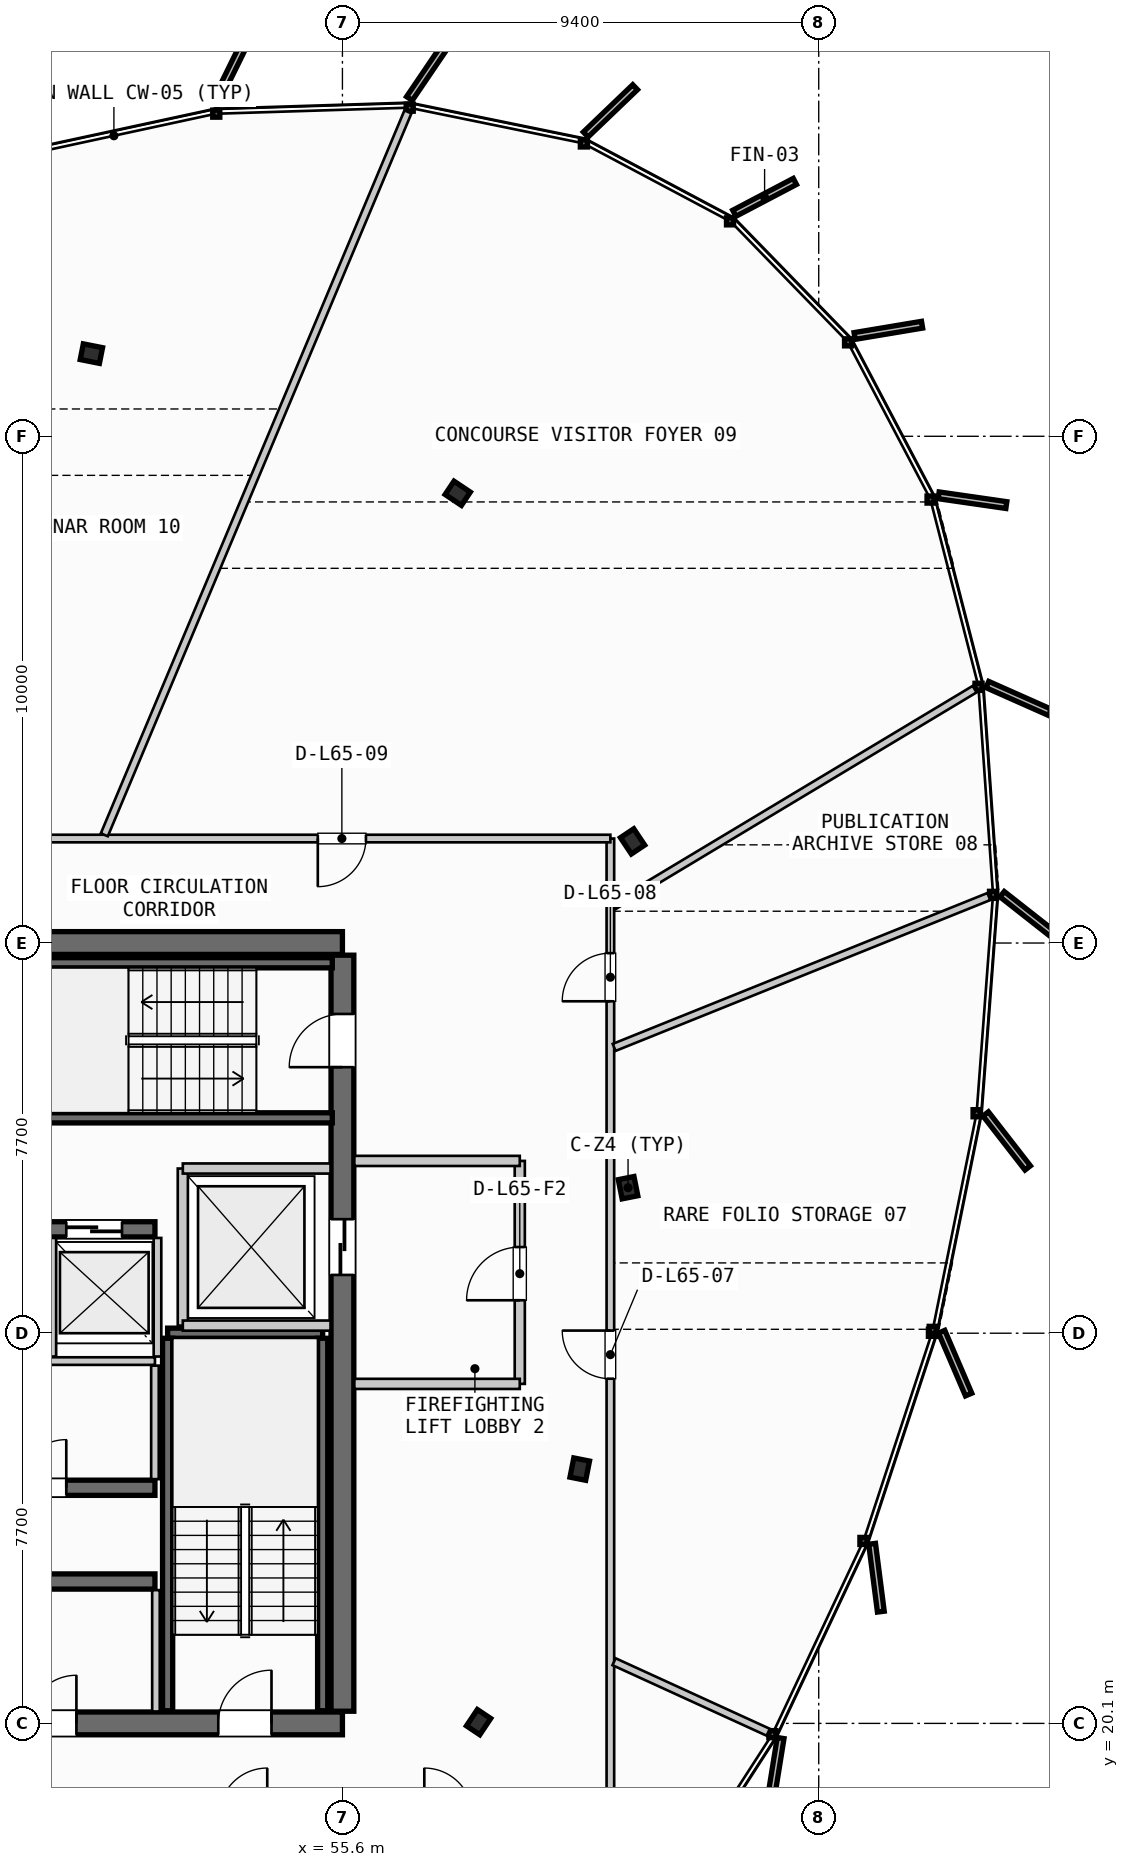
"""IFC4 building model, lengths in metres.
Left out: names, types, materials, properties, quantities, classifications, styles, units other than length and angle.
Written with IfcOpenShell. Run it as: python <this file> out.ifc"""

import sys

from ifc_helpers import new_model, si_unit, direction, frame, frame_2d, origin, origin_2d, place, context, subcontext, project, spatial, rectangle, i_section, extrude, source, transform, mapped, element, fill, save


model = new_model("IFC4")
c1 = context("Model", 3, precision=1e-05, world=origin(), true_north=direction((0.0, 1.0)))
c2 = subcontext(c1, "Body", "Model", "MODEL_VIEW")
j1 = project(units=[si_unit("LENGTHUNIT", "METRE"), si_unit("PLANEANGLEUNIT", "RADIAN")], contexts=[c1])
p1 = place(None, origin())
s1 = spatial("IfcSite", under=j1, at=p1, CompositionType="ELEMENT")
p2 = place(p1, origin())
s2 = spatial("IfcBuilding", under=s1, at=p2, CompositionType="ELEMENT")
p3 = place(p2, frame((0.0, 0.0, 249.1)))
s3 = spatial("IfcBuildingStorey", under=s2, at=p3, CompositionType="ELEMENT", Elevation=249.1)
p4 = place(p3, frame((38.0, 20.1, 0.0), z_axis=(0.0, 0.0, 1.0), x_axis=(1.0, 0.0, 0.0)))
e1 = element("IfcWall", 1, at=p4, inside=s3, PredefinedType="SHEAR", context=c2, shape_type="SweptSolid", body=[
    extrude(rectangle(XDim=17.6, YDim=0.45, at=frame_2d((8.8, 0.0))), origin(), (0.0, 0.0, 1.0), 3.21),
])
p5 = place(p4, frame((1.4, 0.0, 0.0)))
e2 = element("IfcOpeningElement", 2, at=p5, cuts=e1, PredefinedType="OPENING", context=c2, shape_type="SweptSolid", body=[
    extrude(rectangle(XDim=1.05, YDim=2.15, at=frame_2d((0.525, 1.075))), frame((0.0, 0.235, 0.0), z_axis=(0.0, -1.0, 0.0), x_axis=(1.0, 0.0, 0.0)), (0.0, 0.0, 1.0), 0.47),
])
p6 = place(p4, frame((15.15, 0.0, 0.0)))
e3 = element("IfcOpeningElement", 3, at=p6, cuts=e1, PredefinedType="OPENING", context=c2, shape_type="SweptSolid", body=[
    extrude(rectangle(XDim=1.05, YDim=2.15, at=frame_2d((0.525, 1.075))), frame((0.0, 0.235, 0.0), z_axis=(0.0, -1.0, 0.0), x_axis=(1.0, 0.0, 0.0)), (0.0, 0.0, 1.0), 0.47),
])
p7 = place(p4, frame((5.25, 0.0, 0.0)))
e4 = element("IfcOpeningElement", 4, at=p7, cuts=e1, PredefinedType="OPENING", context=c2, shape_type="SweptSolid", body=[
    extrude(rectangle(XDim=0.95, YDim=2.15, at=frame_2d((0.475, 1.075))), frame((0.0, 0.235, 0.0), z_axis=(0.0, -1.0, 0.0), x_axis=(1.0, 0.0, 0.0)), (0.0, 0.0, 1.0), 0.47),
])
p8 = place(p4, frame((11.4, 0.0, 0.0)))
e5 = element("IfcOpeningElement", 5, at=p8, cuts=e1, PredefinedType="OPENING", context=c2, shape_type="SweptSolid", body=[
    extrude(rectangle(XDim=0.95, YDim=2.15, at=frame_2d((0.475, 1.075))), frame((0.0, 0.235, 0.0), z_axis=(0.0, -1.0, 0.0), x_axis=(1.0, 0.0, 0.0)), (0.0, 0.0, 1.0), 0.47),
])
p9 = place(p3, frame((55.6, 35.5, 0.0), z_axis=(0.0, 0.0, 1.0), x_axis=(-1.0, 0.0, 0.0)))
e6 = element("IfcWall", 6, at=p9, inside=s3, PredefinedType="SHEAR", context=c2, shape_type="SweptSolid", body=[
    extrude(rectangle(XDim=17.6, YDim=0.45, at=frame_2d((8.8, 0.0))), origin(), (0.0, 0.0, 1.0), 3.21),
])
p10 = place(p9, frame((8.05, 0.0, 0.0)))
e7 = element("IfcOpeningElement", 7, at=p10, cuts=e6, PredefinedType="OPENING", context=c2, shape_type="SweptSolid", body=[
    extrude(rectangle(XDim=1.5, YDim=2.2, at=frame_2d((0.75, 1.1))), frame((0.0, 0.235, 0.0), z_axis=(0.0, -1.0, 0.0), x_axis=(1.0, 0.0, 0.0)), (0.0, 0.0, 1.0), 0.47),
])
p11 = place(p9, frame((15.1, 0.0, 0.0)))
e8 = element("IfcOpeningElement", 8, at=p11, cuts=e6, PredefinedType="OPENING", context=c2, shape_type="SweptSolid", body=[
    extrude(rectangle(XDim=0.95, YDim=2.15, at=frame_2d((0.475, 1.075))), frame((0.0, 0.235, 0.0), z_axis=(0.0, -1.0, 0.0), x_axis=(1.0, 0.0, 0.0)), (0.0, 0.0, 1.0), 0.47),
])
p12 = place(p9, frame((12.6, 0.0, 0.0)))
e9 = element("IfcOpeningElement", 9, at=p12, cuts=e6, PredefinedType="OPENING", context=c2, shape_type="SweptSolid", body=[
    extrude(rectangle(XDim=0.95, YDim=2.15, at=frame_2d((0.475, 1.075))), frame((0.0, 0.235, 0.0), z_axis=(0.0, -1.0, 0.0), x_axis=(1.0, 0.0, 0.0)), (0.0, 0.0, 1.0), 0.47),
])
p13 = place(p9, frame((10.45, 0.0, 0.0)))
e10 = element("IfcOpeningElement", 10, at=p13, cuts=e6, PredefinedType="OPENING", context=c2, shape_type="SweptSolid", body=[
    extrude(rectangle(XDim=0.95, YDim=2.15, at=frame_2d((0.475, 1.075))), frame((0.0, 0.235, 0.0), z_axis=(0.0, -1.0, 0.0), x_axis=(1.0, 0.0, 0.0)), (0.0, 0.0, 1.0), 0.47),
])
p14 = place(p3, frame((55.6, 20.34, 0.0), z_axis=(0.0, 0.0, 1.0), x_axis=(0.0, 1.0, 0.0)))
e11 = element("IfcWall", 11, at=p14, inside=s3, PredefinedType="SHEAR", context=c2, shape_type="SweptSolid", body=[
    extrude(rectangle(XDim=14.92, YDim=0.45, at=frame_2d((7.46, 0.0))), origin(), (0.0, 0.0, 1.0), 3.21),
])
p15 = place(p14, frame((12.71, 0.0, 0.0)))
e12 = element("IfcOpeningElement", 12, at=p15, cuts=e11, PredefinedType="OPENING", context=c2, shape_type="SweptSolid", body=[
    extrude(rectangle(XDim=1.05, YDim=2.15, at=frame_2d((0.525, 1.075))), frame((0.0, 0.235, 0.0), z_axis=(0.0, -1.0, 0.0), x_axis=(1.0, 0.0, 0.0)), (0.0, 0.0, 1.0), 0.47),
])
p16 = place(p14, frame((8.61, 0.0, 0.0)))
e13 = element("IfcOpeningElement", 13, at=p16, cuts=e11, PredefinedType="OPENING", context=c2, shape_type="SweptSolid", body=[
    extrude(rectangle(XDim=1.1, YDim=2.2, at=frame_2d((0.55, 1.1))), frame((0.0, 0.235, 0.0), z_axis=(0.0, -1.0, 0.0), x_axis=(1.0, 0.0, 0.0)), (0.0, 0.0, 1.0), 0.47),
])
p17 = place(p3, frame((47.65, 22.9, 0.0), z_axis=(0.0, 0.0, 1.0), x_axis=(1.0, 0.0, 0.0)))
e14 = element("IfcWall", 14, at=p17, inside=s3, PredefinedType="SHEAR", context=c2, shape_type="SweptSolid", body=[
    extrude(rectangle(XDim=4.25, YDim=0.3, at=frame_2d((2.125, 0.0))), origin(), (0.0, 0.0, 1.0), 3.21),
])
p18 = place(p3, frame((47.65, 24.75, 0.0), z_axis=(0.0, 0.0, 1.0), x_axis=(1.0, 0.0, 0.0)))
e15 = element("IfcWall", 15, at=p18, inside=s3, PredefinedType="SHEAR", context=c2, shape_type="SweptSolid", body=[
    extrude(rectangle(XDim=4.25, YDim=0.3, at=frame_2d((2.125, 0.0))), origin(), (0.0, 0.0, 1.0), 3.21),
])
p19 = place(p18, frame((1.55, 0.0, 0.0)))
e16 = element("IfcOpeningElement", 16, at=p19, cuts=e15, PredefinedType="OPENING", context=c2, shape_type="SweptSolid", body=[
    extrude(rectangle(XDim=0.95, YDim=2.15, at=frame_2d((0.475, 1.075))), frame((0.0, 0.16, 0.0), z_axis=(0.0, -1.0, 0.0), x_axis=(1.0, 0.0, 0.0)), (0.0, 0.0, 1.0), 0.32),
])
p20 = place(p3, frame((47.65, 29.85, 0.0), z_axis=(0.0, 0.0, 1.0), x_axis=(1.0, 0.0, 0.0)))
e17 = element("IfcWall", 17, at=p20, inside=s3, PredefinedType="SHEAR", context=c2, shape_type="SweptSolid", body=[
    extrude(rectangle(XDim=4.25, YDim=0.3, at=frame_2d((2.125, 0.0))), origin(), (0.0, 0.0, 1.0), 3.21),
])
p21 = place(p20, frame((0.45, 0.0, 0.0)))
e18 = element("IfcOpeningElement", 18, at=p21, cuts=e17, PredefinedType="OPENING", context=c2, shape_type="SweptSolid", body=[
    extrude(rectangle(XDim=1.1, YDim=2.2, at=frame_2d((0.55, 1.1))), frame((0.0, 0.16, 0.0), z_axis=(0.0, -1.0, 0.0), x_axis=(1.0, 0.0, 0.0)), (0.0, 0.0, 1.0), 0.32),
])
p22 = place(p20, frame((2.5, 0.0, 0.0)))
e19 = element("IfcOpeningElement", 19, at=p22, cuts=e17, PredefinedType="OPENING", context=c2, shape_type="SweptSolid", body=[
    extrude(rectangle(XDim=1.1, YDim=2.2, at=frame_2d((0.55, 1.1))), frame((0.0, 0.16, 0.0), z_axis=(0.0, -1.0, 0.0), x_axis=(1.0, 0.0, 0.0)), (0.0, 0.0, 1.0), 0.32),
])
m1 = source(origin(), c2, "Body", "SweptSolid", [
    extrude(i_section(OverallWidth=0.387, OverallDepth=0.316, WebThickness=0.019, FlangeThickness=0.028, FilletRadius=0.015, at=origin_2d()), origin(), (0.0, 0.0, 1.0), 3.21),
])
for number, where, z_axis, x_axis in (
    (20, (61.237, 30.672, 0.0), (0.0, 0.0, 1.0), (0.981, 0.195, 0.0)),
    (21, (61.326, 37.506, 0.0), (0.0, 0.0, 1.0), (0.831, 0.556, 0.0)),
    (22, (57.875, 44.375, 0.0), (0.0, 0.0, 1.0), (0.556, 0.831, 0.0)),
    (23, (50.645, 47.132, 0.0), (0.0, 0.0, 1.0), (0.195, 0.981, 0.0)),
    (24, (58.287, 20.125, 0.0), (0.0, 0.0, 1.0), (0.831, -0.556, 0.0)),
    (25, (60.284, 25.118, 0.0), (0.0, 0.0, 1.0), (0.981, -0.195, 0.0)),
):
    element("IfcColumn", number, at=place(p3, frame(where, z_axis=z_axis, x_axis=x_axis)), inside=s3, PredefinedType="COLUMN", context=c2, shape_type="MappedRepresentation", body=[
        mapped(m1, transform((0.0, 0.0, 0.0), scale=1.0)),
    ])
p23 = place(p3, frame((52.15, 27.8, 0.0), z_axis=(0.0, 0.0, 1.0), x_axis=(1.0, 0.0, 0.0)))
e26 = element("IfcWall", 26, at=p23, inside=s3, PredefinedType="SHEAR", context=c2, shape_type="SweptSolid", body=[
    extrude(rectangle(XDim=3.06, YDim=0.2, at=frame_2d((1.53, 0.0))), origin(), (0.0, 0.0, 1.0), 3.21),
])
for number, where, z_axis, x_axis in (
    (27, (55.21, 27.7, 0.0), (0.0, 0.0, 1.0), (0.0, -1.0, 0.0)),
    (28, (52.15, 20.35, 0.0), (0.0, 0.0, 1.0), (0.0, 1.0, 0.0)),
    (29, (48.05, 35.11, 0.0), (0.0, 0.0, 1.0), (1.0, 0.0, 0.0)),
    (30, (55.4, 32.05, 0.0), (0.0, 0.0, 1.0), (-1.0, 0.0, 0.0)),
):
    element("IfcWall", number, at=place(p3, frame(where, z_axis=z_axis, x_axis=x_axis)), inside=s3, PredefinedType="SHEAR", context=c2, shape_type="SweptSolid", body=[
        extrude(rectangle(XDim=7.35, YDim=0.2, at=frame_2d((3.675, 0.0))), origin(), (0.0, 0.0, 1.0), 3.21),
    ])
p24 = place(p3, frame((52.45, 27.95, 0.0), z_axis=(0.0, 0.0, 1.0), x_axis=(0.0, 1.0, 0.0)))
e31 = element("IfcWall", 31, at=p24, inside=s3, PredefinedType="PARTITIONING", context=c2, shape_type="SweptSolid", body=[
    extrude(rectangle(XDim=3.1, YDim=0.2, at=frame_2d((1.55, 0.0))), origin(), (0.0, 0.0, 1.0), 2.28),
])
for number, where, z_axis, x_axis in (
    (32, (52.45, 27.95, 0.0), (0.0, 0.0, 1.0), (1.0, 0.0, 0.0)),
    (33, (52.45, 31.05, 0.0), (0.0, 0.0, 1.0), (1.0, 0.0, 0.0)),
):
    element("IfcWall", number, at=place(p3, frame(where, z_axis=z_axis, x_axis=x_axis)), inside=s3, PredefinedType="PARTITIONING", context=c2, shape_type="SweptSolid", body=[
        extrude(rectangle(XDim=2.915, YDim=0.2, at=frame_2d((1.458, 0.0))), origin(), (0.0, 0.0, 1.0), 2.28),
    ])
p25 = place(p3, frame((59.1, 26.8, 0.0), z_axis=(0.0, 0.0, 1.0), x_axis=(0.0, 1.0, 0.0)))
e34 = element("IfcWall", 34, at=p25, inside=s3, PredefinedType="PARTITIONING", context=c2, shape_type="SweptSolid", body=[
    extrude(rectangle(XDim=4.4, YDim=0.2, at=frame_2d((2.2, 0.0))), origin(), (0.0, 0.0, 1.0), 2.28),
])
p26 = place(p25, frame((1.65, 0.0, 0.0)))
e35 = element("IfcOpeningElement", 35, at=p26, cuts=e34, PredefinedType="OPENING", context=c2, shape_type="SweptSolid", body=[
    extrude(rectangle(XDim=1.05, YDim=2.15, at=frame_2d((0.525, 1.075))), frame((0.0, 0.11, 0.0), z_axis=(0.0, -1.0, 0.0), x_axis=(1.0, 0.0, 0.0)), (0.0, 0.0, 1.0), 0.22),
])
for number, where, z_axis, x_axis in (
    (36, (55.835, 26.8, 0.0), (0.0, 0.0, 1.0), (1.0, 0.0, 0.0)),
    (37, (55.835, 31.2, 0.0), (0.0, 0.0, 1.0), (1.0, 0.0, 0.0)),
):
    element("IfcWall", number, at=place(p3, frame(where, z_axis=z_axis, x_axis=x_axis)), inside=s3, PredefinedType="PARTITIONING", context=c2, shape_type="SweptSolid", body=[
        extrude(rectangle(XDim=3.265, YDim=0.2, at=frame_2d((1.633, 0.0))), origin(), (0.0, 0.0, 1.0), 2.28),
    ])
p27 = place(p3, frame((51.92, 20.335, 0.0), z_axis=(0.0, 0.0, 1.0), x_axis=(0.0, 1.0, 0.0)))
e38 = element("IfcWall", 38, at=p27, inside=s3, PredefinedType="PARTITIONING", context=c2, shape_type="SweptSolid", body=[
    extrude(rectangle(XDim=2.395, YDim=0.15, at=frame_2d((1.198, 0.0))), origin(), (0.0, 0.0, 1.0), 2.28),
])
p28 = place(p3, frame((47.65, 27.25, 0.0), z_axis=(0.0, 0.0, 1.0), x_axis=(1.0, 0.0, 0.0)))
e39 = element("IfcWall", 39, at=p28, inside=s3, PredefinedType="PARTITIONING", context=c2, shape_type="SweptSolid", body=[
    extrude(rectangle(XDim=4.25, YDim=0.15, at=frame_2d((2.125, 0.0))), origin(), (0.0, 0.0, 1.0), 2.28),
])
p29 = place(p3, frame((51.9, 24.92, 0.0), z_axis=(0.0, 0.0, 1.0), x_axis=(0.0, 1.0, 0.0)))
e40 = element("IfcWall", 40, at=p29, inside=s3, PredefinedType="PARTITIONING", context=c2, shape_type="SweptSolid", body=[
    extrude(rectangle(XDim=2.24, YDim=0.15, at=frame_2d((1.12, 0.0))), origin(), (0.0, 0.0, 1.0), 2.28),
])
for number, where, z_axis, x_axis in (
    (41, (49.875, 27.34, 0.0), (0.0, 0.0, 1.0), (0.0, 1.0, 0.0)),
    (42, (51.95, 27.34, 0.0), (0.0, 0.0, 1.0), (0.0, 1.0, 0.0)),
):
    element("IfcWall", number, at=place(p3, frame(where, z_axis=z_axis, x_axis=x_axis)), inside=s3, PredefinedType="PARTITIONING", context=c2, shape_type="SweptSolid", body=[
        extrude(rectangle(XDim=2.34, YDim=0.15, at=frame_2d((1.17, 0.0))), origin(), (0.0, 0.0, 1.0), 2.28),
    ])
p30 = place(p3, frame((60.888, 18.269, 0.0), z_axis=(0.0, 0.0, 1.0), x_axis=(0.0, 1.0, 0.0)))
e43 = element("IfcWall", 43, at=p30, inside=s3, PredefinedType="PARTITIONING", context=c2, shape_type="SweptSolid", body=[
    extrude(rectangle(XDim=19.293, YDim=0.15, at=frame_2d((9.646, 0.0))), origin(), (0.0, 0.0, 1.0), 2.28),
])
p31 = place(p30, frame((8.633, 0.0, 0.0)))
e44 = element("IfcOpeningElement", 44, at=p31, cuts=e43, PredefinedType="OPENING", context=c2, shape_type="SweptSolid", body=[
    extrude(rectangle(XDim=0.95, YDim=2.15, at=frame_2d((0.475, 1.075))), frame((0.0, 0.085, 0.0), z_axis=(0.0, -1.0, 0.0), x_axis=(1.0, 0.0, 0.0)), (0.0, 0.0, 1.0), 0.17),
])
p32 = place(p30, frame((16.081, 0.0, 0.0)))
e45 = element("IfcOpeningElement", 45, at=p32, cuts=e43, PredefinedType="OPENING", context=c2, shape_type="SweptSolid", body=[
    extrude(rectangle(XDim=0.95, YDim=2.15, at=frame_2d((0.475, 1.075))), frame((0.0, 0.085, 0.0), z_axis=(0.0, -1.0, 0.0), x_axis=(1.0, 0.0, 0.0)), (0.0, 0.0, 1.0), 0.17),
])
p33 = place(p3, frame((60.888, 37.562, 0.0), z_axis=(0.0, 0.0, 1.0), x_axis=(-1.0, 0.0, 0.0)))
e46 = element("IfcWall", 46, at=p33, inside=s3, PredefinedType="PARTITIONING", context=c2, shape_type="SweptSolid", body=[
    extrude(rectangle(XDim=28.038, YDim=0.15, at=frame_2d((14.019, 0.0))), origin(), (0.0, 0.0, 1.0), 2.28),
])
p34 = place(p33, frame((4.824, 0.0, 0.0)))
e47 = element("IfcOpeningElement", 47, at=p34, cuts=e46, PredefinedType="OPENING", context=c2, shape_type="SweptSolid", body=[
    extrude(rectangle(XDim=0.95, YDim=2.15, at=frame_2d((0.475, 1.075))), frame((0.0, 0.085, 0.0), z_axis=(0.0, -1.0, 0.0), x_axis=(1.0, 0.0, 0.0)), (0.0, 0.0, 1.0), 0.17),
])
p35 = place(p33, frame((11.973, 0.0, 0.0)))
e48 = element("IfcOpeningElement", 48, at=p35, cuts=e46, PredefinedType="OPENING", context=c2, shape_type="SweptSolid", body=[
    extrude(rectangle(XDim=0.95, YDim=2.15, at=frame_2d((0.475, 1.075))), frame((0.0, 0.085, 0.0), z_axis=(0.0, -1.0, 0.0), x_axis=(1.0, 0.0, 0.0)), (0.0, 0.0, 1.0), 0.17),
])
p36 = place(p33, frame((20.705, 0.0, 0.0)))
e49 = element("IfcOpeningElement", 49, at=p36, cuts=e46, PredefinedType="OPENING", context=c2, shape_type="SweptSolid", body=[
    extrude(rectangle(XDim=0.95, YDim=2.15, at=frame_2d((0.475, 1.075))), frame((0.0, 0.085, 0.0), z_axis=(0.0, -1.0, 0.0), x_axis=(1.0, 0.0, 0.0)), (0.0, 0.0, 1.0), 0.17),
])
p37 = place(p3, frame((60.961, 21.317, 0.0), z_axis=(0.0, 0.0, 1.0), x_axis=(0.909386961263, -0.415951144589, 0.0)))
e50 = element("IfcWall", 50, at=p37, inside=s3, PredefinedType="PARTITIONING", context=c2, shape_type="SweptSolid", body=[
    extrude(rectangle(XDim=3.346, YDim=0.15, at=frame_2d((1.673, 0.0))), origin(), (0.0, 0.0, 1.0), 2.28),
])
p38 = place(p3, frame((60.962, 33.44, 0.0), z_axis=(0.0, 0.0, 1.0), x_axis=(0.927646411648, 0.373459683173, 0.0)))
e51 = element("IfcWall", 51, at=p38, inside=s3, PredefinedType="PARTITIONING", context=c2, shape_type="SweptSolid", body=[
    extrude(rectangle(XDim=7.971, YDim=0.15, at=frame_2d((3.986, 0.0))), origin(), (0.0, 0.0, 1.0), 2.28),
])
p39 = place(p3, frame((60.957, 36.235, 0.0), z_axis=(0.0, 0.0, 1.0), x_axis=(0.857355417477, 0.514724866431, 0.0)))
e52 = element("IfcWall", 52, at=p39, inside=s3, PredefinedType="PARTITIONING", context=c2, shape_type="SweptSolid", body=[
    extrude(rectangle(XDim=8.305, YDim=0.15, at=frame_2d((4.152, 0.0))), origin(), (0.0, 0.0, 1.0), 2.28),
])
p40 = place(p3, frame((50.901, 37.636, 0.0), z_axis=(0.0, 0.0, 1.0), x_axis=(0.387249919783, 0.921974782534, 0.0)))
e53 = element("IfcWall", 53, at=p40, inside=s3, PredefinedType="PARTITIONING", context=c2, shape_type="SweptSolid", body=[
    extrude(rectangle(XDim=15.474, YDim=0.15, at=frame_2d((7.737, 0.0))), origin(), (0.0, 0.0, 1.0), 2.28),
])
m2 = source(origin(), c2, "Body", "SweptSolid", [
    extrude(rectangle(XDim=1.05, YDim=2.15, at=frame_2d((0.525, 1.075))), frame((0.0, 0.025, 0.0), z_axis=(0.0, -1.0, 0.0), x_axis=(1.0, 0.0, 0.0)), (0.0, 0.0, 1.0), 0.05),
])
p41 = place(p6, origin())
e54 = element("IfcDoor", 54, at=p41, inside=s3, OperationType="SINGLE_SWING_RIGHT", PredefinedType="DOOR", context=c2, shape_type="MappedRepresentation", body=[
    mapped(m2, transform((0.0, 0.0, 0.0), scale=1.0)),
])
fill(e3, e54)
p42 = place(p15, origin())
e55 = element("IfcDoor", 55, at=p42, inside=s3, OperationType="SINGLE_SWING_LEFT", PredefinedType="DOOR", context=c2, shape_type="MappedRepresentation", body=[
    mapped(m2, transform((0.0, 0.0, 0.0), scale=1.0)),
])
fill(e12, e55)
m3 = source(origin(), c2, "Body", "SweptSolid", [
    extrude(rectangle(XDim=1.1, YDim=2.2, at=frame_2d((0.55, 1.1))), frame((0.0, 0.025, 0.0), z_axis=(0.0, -1.0, 0.0), x_axis=(1.0, 0.0, 0.0)), (0.0, 0.0, 1.0), 0.05),
])
p43 = place(p16, origin())
e56 = element("IfcDoor", 56, at=p43, inside=s3, OperationType="SLIDING_TO_RIGHT", PredefinedType="DOOR", context=c2, shape_type="MappedRepresentation", body=[
    mapped(m3, transform((0.0, 0.0, 0.0), scale=1.0)),
])
fill(e13, e56)
m4 = source(origin(), c2, "Body", "SweptSolid", [
    extrude(rectangle(XDim=0.95, YDim=2.15, at=frame_2d((0.475, 1.075))), frame((0.0, 0.025, 0.0), z_axis=(0.0, -1.0, 0.0), x_axis=(1.0, 0.0, 0.0)), (0.0, 0.0, 1.0), 0.05),
])
p44 = place(p8, origin())
e57 = element("IfcDoor", 57, at=p44, inside=s3, OperationType="SINGLE_SWING_RIGHT", PredefinedType="DOOR", context=c2, shape_type="MappedRepresentation", body=[
    mapped(m4, transform((0.0, 0.0, 0.0), scale=1.0)),
])
fill(e5, e57)
p45 = place(p19, origin())
e58 = element("IfcDoor", 58, at=p45, inside=s3, OperationType="SINGLE_SWING_RIGHT", PredefinedType="DOOR", context=c2, shape_type="MappedRepresentation", body=[
    mapped(m4, transform((0.0, 0.0, 0.0), scale=1.0)),
])
fill(e16, e58)
p46 = place(p22, origin())
e59 = element("IfcDoor", 59, at=p46, inside=s3, OperationType="SLIDING_TO_LEFT", PredefinedType="DOOR", context=c2, shape_type="MappedRepresentation", body=[
    mapped(m3, transform((0.0, 0.0, 0.0), scale=1.0)),
])
fill(e19, e59)
p47 = place(p26, origin())
e60 = element("IfcDoor", 60, at=p47, inside=s3, OperationType="SINGLE_SWING_LEFT", PredefinedType="DOOR", context=c2, shape_type="MappedRepresentation", body=[
    mapped(m2, transform((0.0, 0.0, 0.0), scale=1.0)),
])
fill(e35, e60)
p48 = place(p31, origin())
e61 = element("IfcDoor", 61, at=p48, inside=s3, OperationType="SINGLE_SWING_RIGHT", PredefinedType="DOOR", context=c2, shape_type="MappedRepresentation", body=[
    mapped(m4, transform((0.0, 0.0, 0.0), scale=1.0)),
])
fill(e44, e61)
p49 = place(p32, origin())
e62 = element("IfcDoor", 62, at=p49, inside=s3, OperationType="SINGLE_SWING_LEFT", PredefinedType="DOOR", context=c2, shape_type="MappedRepresentation", body=[
    mapped(m4, transform((0.0, 0.0, 0.0), scale=1.0)),
])
fill(e45, e62)
p50 = place(p34, origin())
e63 = element("IfcDoor", 63, at=p50, inside=s3, OperationType="SINGLE_SWING_RIGHT", PredefinedType="DOOR", context=c2, shape_type="MappedRepresentation", body=[
    mapped(m4, transform((0.0, 0.0, 0.0), scale=1.0)),
])
fill(e47, e63)
save(model, sys.argv[1])
